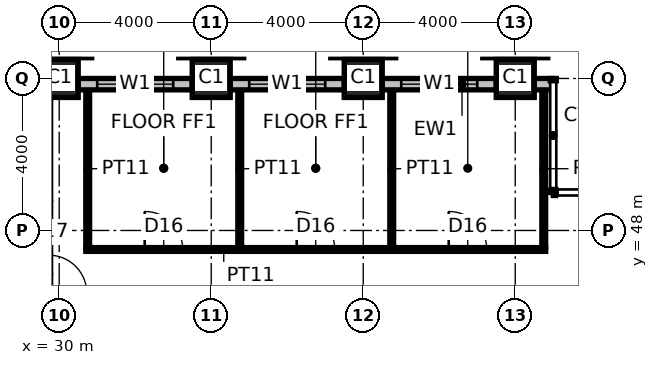
"""IFC4 building model, lengths in metres.
Left out: names, types, materials, properties, quantities, classifications, styles, units other than length and angle.
Written with IfcOpenShell. Run it as: python <this file> out.ifc"""

import sys

from ifc_helpers import new_model, si_unit, direction, frame, frame_2d, origin, origin_2d, place, context, subcontext, project, spatial, rectangle, hollow_rectangle, extrude, element, fill, save


model = new_model("IFC4")
c1 = context("Model", 3, precision=1e-05, world=origin(), true_north=direction((0.0, 1.0)))
c2 = subcontext(c1, "Body", "Model", "MODEL_VIEW")
j1 = project(units=[si_unit("LENGTHUNIT", "METRE"), si_unit("PLANEANGLEUNIT", "RADIAN")], contexts=[c1])
p1 = place(None, origin())
s1 = spatial("IfcSite", under=j1, at=p1, CompositionType="ELEMENT")
p2 = place(p1, origin())
s2 = spatial("IfcBuilding", under=s1, at=p2, CompositionType="ELEMENT")
p3 = place(p2, frame((0.0, 0.0, 159.8)))
s3 = spatial("IfcBuildingStorey", under=s2, at=p3, CompositionType="ELEMENT", Elevation=159.8)
for number, where, z_axis, x_axis in (
    (1, (30.0, 52.0, 0.0), (0.0, 0.0, 1.0), (1.0, 0.0, 0.0)),
    (2, (34.0, 52.0, 0.0), (0.0, 0.0, 1.0), (1.0, 0.0, 0.0)),
    (3, (38.0, 52.0, 0.0), (0.0, 0.0, 1.0), (1.0, 0.0, 0.0)),
    (4, (42.0, 52.0, 0.0), (0.0, 0.0, 1.0), (1.0, 0.0, 0.0)),
):
    element("IfcColumn", number, at=place(p3, frame(where, z_axis=z_axis, x_axis=x_axis)), inside=s3, PredefinedType="COLUMN", context=c2, shape_type="SweptSolid", body=[
        extrude(hollow_rectangle(XDim=1.0, YDim=1.0, WallThickness=0.1, at=origin_2d()), origin(), (0.0, 0.0, 1.0), 4.0),
    ])
p4 = place(p3, frame((30.7, 47.5, 0.0), z_axis=(0.0, 0.0, 1.0), x_axis=(1.0, 0.0, 0.0)))
e5 = element("IfcWall", 5, at=p4, inside=s3, PredefinedType="PARTITIONING", context=c2, shape_type="SweptSolid", body=[
    extrude(rectangle(XDim=12.1, YDim=0.1, at=frame_2d((6.05, 0.0))), origin(), (0.0, 0.0, 1.0), 3.85),
])
p5 = place(p4, frame((1.55, 0.0, 0.0)))
e6 = element("IfcOpeningElement", 6, at=p5, cuts=e5, PredefinedType="OPENING", context=c2, shape_type="SweptSolid", body=[
    extrude(rectangle(XDim=1.0, YDim=2.2, at=frame_2d((0.5, 1.1))), frame((0.0, 0.06, 0.0), z_axis=(0.0, -1.0, 0.0), x_axis=(1.0, 0.0, 0.0)), (0.0, 0.0, 1.0), 0.12),
])
p6 = place(p4, frame((5.55, 0.0, 0.0)))
e7 = element("IfcOpeningElement", 7, at=p6, cuts=e5, PredefinedType="OPENING", context=c2, shape_type="SweptSolid", body=[
    extrude(rectangle(XDim=1.0, YDim=2.2, at=frame_2d((0.5, 1.1))), frame((0.0, 0.06, 0.0), z_axis=(0.0, -1.0, 0.0), x_axis=(1.0, 0.0, 0.0)), (0.0, 0.0, 1.0), 0.12),
])
p7 = place(p4, frame((9.55, 0.0, 0.0)))
e8 = element("IfcOpeningElement", 8, at=p7, cuts=e5, PredefinedType="OPENING", context=c2, shape_type="SweptSolid", body=[
    extrude(rectangle(XDim=1.0, YDim=2.2, at=frame_2d((0.5, 1.1))), frame((0.0, 0.06, 0.0), z_axis=(0.0, -1.0, 0.0), x_axis=(1.0, 0.0, 0.0)), (0.0, 0.0, 1.0), 0.12),
])
for number, where, z_axis, x_axis in (
    (9, (30.75, 47.55, 0.0), (0.0, 0.0, 1.0), (0.0, 1.0, 0.0)),
    (10, (34.75, 47.55, 0.0), (0.0, 0.0, 1.0), (0.0, 1.0, 0.0)),
    (11, (38.75, 47.55, 0.0), (0.0, 0.0, 1.0), (0.0, 1.0, 0.0)),
    (12, (42.75, 47.55, 0.0), (0.0, 0.0, 1.0), (0.0, 1.0, 0.0)),
):
    element("IfcWall", number, at=place(p3, frame(where, z_axis=z_axis, x_axis=x_axis)), inside=s3, PredefinedType="PARTITIONING", context=c2, shape_type="SweptSolid", body=[
        extrude(rectangle(XDim=4.15, YDim=0.1, at=frame_2d((2.075, 0.0))), origin(), (0.0, 0.0, 1.0), 3.85),
    ])
p8 = place(p3, frame((33.5, 51.85, 0.0), z_axis=(0.0, 0.0, 1.0), x_axis=(-1.0, 0.0, 0.0)))
e13 = element("IfcWall", 13, at=p8, inside=s3, PredefinedType="ELEMENTEDWALL", context=c2, shape_type="SweptSolid", body=[
    extrude(rectangle(XDim=3.0, YDim=0.3, at=frame_2d((1.5, 0.0))), origin(), (0.0, 0.0, 1.0), 2.85),
])
p9 = place(p8, frame((0.5, 0.0, 0.8)))
e14 = element("IfcOpeningElement", 14, at=p9, cuts=e13, PredefinedType="OPENING", context=c2, shape_type="SweptSolid", body=[
    extrude(rectangle(XDim=2.0, YDim=2.0, at=frame_2d((1.0, 1.0))), frame((0.0, 0.16, 0.0), z_axis=(0.0, -1.0, 0.0), x_axis=(1.0, 0.0, 0.0)), (0.0, 0.0, 1.0), 0.32),
])
p10 = place(p3, frame((37.5, 51.85, 0.0), z_axis=(0.0, 0.0, 1.0), x_axis=(-1.0, 0.0, 0.0)))
e15 = element("IfcWall", 15, at=p10, inside=s3, PredefinedType="ELEMENTEDWALL", context=c2, shape_type="SweptSolid", body=[
    extrude(rectangle(XDim=3.0, YDim=0.3, at=frame_2d((1.5, 0.0))), origin(), (0.0, 0.0, 1.0), 2.85),
])
p11 = place(p10, frame((0.5, 0.0, 0.8)))
e16 = element("IfcOpeningElement", 16, at=p11, cuts=e15, PredefinedType="OPENING", context=c2, shape_type="SweptSolid", body=[
    extrude(rectangle(XDim=2.0, YDim=2.0, at=frame_2d((1.0, 1.0))), frame((0.0, 0.16, 0.0), z_axis=(0.0, -1.0, 0.0), x_axis=(1.0, 0.0, 0.0)), (0.0, 0.0, 1.0), 0.32),
])
p12 = place(p3, frame((41.5, 51.85, 0.0), z_axis=(0.0, 0.0, 1.0), x_axis=(-1.0, 0.0, 0.0)))
e17 = element("IfcWall", 17, at=p12, inside=s3, PredefinedType="ELEMENTEDWALL", context=c2, shape_type="SweptSolid", body=[
    extrude(rectangle(XDim=3.0, YDim=0.3, at=frame_2d((1.5, 0.0))), origin(), (0.0, 0.0, 1.0), 2.85),
])
p13 = place(p12, frame((0.5, 0.0, 0.8)))
e18 = element("IfcOpeningElement", 18, at=p13, cuts=e17, PredefinedType="OPENING", context=c2, shape_type="SweptSolid", body=[
    extrude(rectangle(XDim=2.0, YDim=2.0, at=frame_2d((1.0, 1.0))), frame((0.0, 0.16, 0.0), z_axis=(0.0, -1.0, 0.0), x_axis=(1.0, 0.0, 0.0)), (0.0, 0.0, 1.0), 0.32),
])
p14 = place(p3, frame((42.97, 51.85, 0.0), z_axis=(0.0, 0.0, 1.0), x_axis=(-1.0, 0.0, 0.0)))
e19 = element("IfcWall", 19, at=p14, inside=s3, PredefinedType="ELEMENTEDWALL", context=c2, shape_type="SweptSolid", body=[
    extrude(rectangle(XDim=0.47, YDim=0.3, at=frame_2d((0.235, 0.0))), origin(), (0.0, 0.0, 1.0), 2.95),
])
p15 = place(p5, origin())
e20 = element("IfcDoor", 20, at=p15, inside=s3, OperationType="SINGLE_SWING_LEFT", PredefinedType="DOOR", context=c2, shape_type="SweptSolid", body=[
    extrude(rectangle(XDim=1.0, YDim=2.2, at=frame_2d((0.5, 1.1))), frame((0.0, 0.025, 0.0), z_axis=(0.0, -1.0, 0.0), x_axis=(1.0, 0.0, 0.0)), (0.0, 0.0, 1.0), 0.05),
])
fill(e6, e20)
p16 = place(p6, origin())
e21 = element("IfcDoor", 21, at=p16, inside=s3, OperationType="SINGLE_SWING_LEFT", PredefinedType="DOOR", context=c2, shape_type="SweptSolid", body=[
    extrude(rectangle(XDim=1.0, YDim=2.2, at=frame_2d((0.5, 1.1))), frame((0.0, 0.025, 0.0), z_axis=(0.0, -1.0, 0.0), x_axis=(1.0, 0.0, 0.0)), (0.0, 0.0, 1.0), 0.05),
])
fill(e7, e21)
p17 = place(p7, origin())
e22 = element("IfcDoor", 22, at=p17, inside=s3, OperationType="SINGLE_SWING_LEFT", PredefinedType="DOOR", context=c2, shape_type="SweptSolid", body=[
    extrude(rectangle(XDim=1.0, YDim=2.2, at=frame_2d((0.5, 1.1))), frame((0.0, 0.025, 0.0), z_axis=(0.0, -1.0, 0.0), x_axis=(1.0, 0.0, 0.0)), (0.0, 0.0, 1.0), 0.05),
])
fill(e8, e22)
p18 = place(p9, origin())
e23 = element("IfcWindow", 23, at=p18, inside=s3, PartitioningType="SINGLE_PANEL", PredefinedType="WINDOW", context=c2, shape_type="SweptSolid", body=[
    extrude(rectangle(XDim=2.0, YDim=2.0, at=frame_2d((1.0, 1.0))), frame((0.0, 0.03, 0.0), z_axis=(0.0, -1.0, 0.0), x_axis=(1.0, 0.0, 0.0)), (0.0, 0.0, 1.0), 0.06),
])
fill(e14, e23)
p19 = place(p11, origin())
e24 = element("IfcWindow", 24, at=p19, inside=s3, PartitioningType="SINGLE_PANEL", PredefinedType="WINDOW", context=c2, shape_type="SweptSolid", body=[
    extrude(rectangle(XDim=2.0, YDim=2.0, at=frame_2d((1.0, 1.0))), frame((0.0, 0.03, 0.0), z_axis=(0.0, -1.0, 0.0), x_axis=(1.0, 0.0, 0.0)), (0.0, 0.0, 1.0), 0.06),
])
fill(e16, e24)
p20 = place(p13, origin())
e25 = element("IfcWindow", 25, at=p20, inside=s3, PartitioningType="SINGLE_PANEL", PredefinedType="WINDOW", context=c2, shape_type="SweptSolid", body=[
    extrude(rectangle(XDim=2.0, YDim=2.0, at=frame_2d((1.0, 1.0))), frame((0.0, 0.03, 0.0), z_axis=(0.0, -1.0, 0.0), x_axis=(1.0, 0.0, 0.0)), (0.0, 0.0, 1.0), 0.06),
])
fill(e18, e25)
save(model, sys.argv[1])
